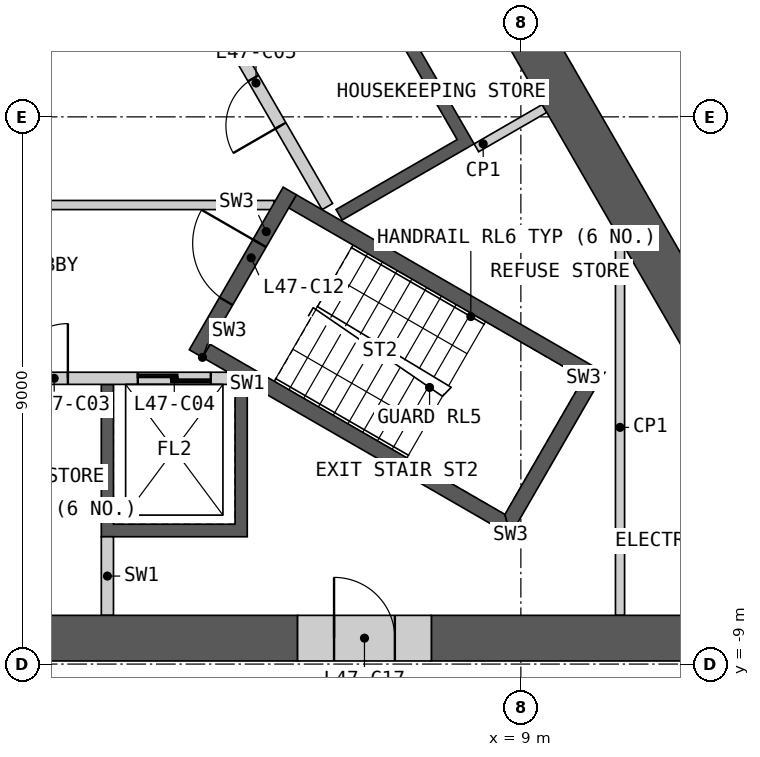
"""IFC4 building model, lengths in metres.
Left out: names, types, materials, properties, quantities, classifications, styles, units other than length and angle.
Written with IfcOpenShell. Run it as: python <this file> out.ifc"""

import sys

from ifc_helpers import new_model, si_unit, direction, frame, frame_2d, origin, place, context, subcontext, project, spatial, polyline, rectangle, outline, extrude, element, fill, save


model = new_model("IFC4")
c1 = context("Model", 3, precision=1e-05, world=origin(), true_north=direction((0.0, 1.0)))
c2 = subcontext(c1, "Body", "Model", "MODEL_VIEW")
j1 = project(units=[si_unit("LENGTHUNIT", "METRE"), si_unit("PLANEANGLEUNIT", "RADIAN")], contexts=[c1])
p1 = place(None, origin())
s1 = spatial("IfcSite", under=j1, at=p1, CompositionType="ELEMENT")
p2 = place(p1, origin())
s2 = spatial("IfcBuilding", under=s1, at=p2, CompositionType="ELEMENT")
p3 = place(p2, frame((0.0, 0.0, 212.4)))
s3 = spatial("IfcBuildingStorey", under=s2, at=p3, CompositionType="ELEMENT", Elevation=212.4)
p4 = place(p3, origin())
e1 = element("IfcWall", 1, at=p4, inside=s3, PredefinedType="SHEAR", context=c2, shape_type="SweptSolid", body=[
    extrude(outline(polyline([(4.5, -4.4), (4.5, -6.906), (2.1, -6.906), (2.1, -4.4), (2.3, -4.4), (2.3, -6.7), (4.3, -6.7), (4.3, -4.4), (4.5, -4.4)])), origin(), (0.0, 0.0, 1.0), 3.25),
])
p5 = place(p3, frame((-4.187, -4.3, 0.0), z_axis=(0.0, 0.0, 1.0), x_axis=(1.0, 0.0, 0.0)))
e2 = element("IfcWall", 2, at=p5, inside=s3, PredefinedType="SOLIDWALL", context=c2, shape_type="SweptSolid", body=[
    extrude(rectangle(XDim=8.373, YDim=0.2, at=frame_2d((4.187, 0.0))), origin(), (0.0, 0.0, 1.0), 3.25),
])
p6 = place(p5, frame((0.287, 0.0, 0.0)))
e3 = element("IfcOpeningElement", 3, at=p6, cuts=e2, PredefinedType="OPENING", context=c2, shape_type="SweptSolid", body=[
    extrude(rectangle(XDim=1.2, YDim=2.1, at=frame_2d((0.6, 1.05))), frame((0.0, 0.11, 0.0), z_axis=(0.0, -1.0, 0.0), x_axis=(1.0, 0.0, 0.0)), (0.0, 0.0, 1.0), 0.22),
])
p7 = place(p5, frame((2.387, 0.0, 0.0)))
e4 = element("IfcOpeningElement", 4, at=p7, cuts=e2, PredefinedType="OPENING", context=c2, shape_type="SweptSolid", body=[
    extrude(rectangle(XDim=1.4, YDim=2.1, at=frame_2d((0.7, 1.05))), frame((0.0, 0.11, 0.0), z_axis=(0.0, -1.0, 0.0), x_axis=(1.0, 0.0, 0.0)), (0.0, 0.0, 1.0), 0.22),
])
p8 = place(p5, frame((4.837, 0.0, 0.0)))
e5 = element("IfcOpeningElement", 5, at=p8, cuts=e2, PredefinedType="OPENING", context=c2, shape_type="SweptSolid", body=[
    extrude(rectangle(XDim=0.9, YDim=2.1, at=frame_2d((0.45, 1.05))), frame((0.0, 0.11, 0.0), z_axis=(0.0, -1.0, 0.0), x_axis=(1.0, 0.0, 0.0)), (0.0, 0.0, 1.0), 0.22),
])
p9 = place(p5, frame((6.887, 0.0, 0.0)))
e6 = element("IfcOpeningElement", 6, at=p9, cuts=e2, PredefinedType="OPENING", context=c2, shape_type="SweptSolid", body=[
    extrude(rectangle(XDim=1.2, YDim=2.1, at=frame_2d((0.6, 1.05))), frame((0.0, 0.11, 0.0), z_axis=(0.0, -1.0, 0.0), x_axis=(1.0, 0.0, 0.0)), (0.0, 0.0, 1.0), 0.22),
])
p10 = place(p3, frame((2.2, -6.906, 0.0), z_axis=(0.0, 0.0, 1.0), x_axis=(0.0, -1.0, 0.0)))
e7 = element("IfcWall", 7, at=p10, inside=s3, PredefinedType="SHEAR", context=c2, shape_type="SweptSolid", body=[
    extrude(rectangle(XDim=1.293, YDim=0.2, at=frame_2d((0.646, 0.0))), origin(), (0.0, 0.0, 1.0), 3.25),
])
p11 = place(p3, origin())
e8 = element("IfcWall", 8, at=p11, inside=s3, PredefinedType="SHEAR", context=c2, shape_type="SweptSolid", body=[
    extrude(outline(polyline([(3.76, 2.287), (5.931, 3.54), (8.231, -0.444), (6.061, -1.697), (5.96, -1.524), (7.952, -0.374), (5.852, 3.263), (3.861, 2.113), (3.76, 2.287)])), origin(), (0.0, 0.0, 1.0), 3.25),
])
p12 = place(p3, frame((5.817, -1.476, 0.0), z_axis=(0.0, 0.0, 1.0), x_axis=(-0.500002616675, 0.866023893041, 0.0)))
e9 = element("IfcWall", 9, at=p12, inside=s3, PredefinedType="SOLIDWALL", context=c2, shape_type="SweptSolid", body=[
    extrude(rectangle(XDim=8.373, YDim=0.2, at=frame_2d((4.187, 0.0))), origin(), (0.0, 0.0, 1.0), 3.25),
])
p13 = place(p12, frame((1.537, 0.0, 0.0)))
e10 = element("IfcOpeningElement", 10, at=p13, cuts=e9, PredefinedType="OPENING", context=c2, shape_type="SweptSolid", body=[
    extrude(rectangle(XDim=0.9, YDim=2.1, at=frame_2d((0.45, 1.05))), frame((0.0, 0.11, 0.0), z_axis=(0.0, -1.0, 0.0), x_axis=(1.0, 0.0, 0.0)), (0.0, 0.0, 1.0), 0.22),
])
p14 = place(p12, frame((4.837, 0.0, 0.0)))
e11 = element("IfcOpeningElement", 11, at=p14, cuts=e9, PredefinedType="OPENING", context=c2, shape_type="SweptSolid", body=[
    extrude(rectangle(XDim=0.9, YDim=2.1, at=frame_2d((0.45, 1.05))), frame((0.0, 0.11, 0.0), z_axis=(0.0, -1.0, 0.0), x_axis=(1.0, 0.0, 0.0)), (0.0, 0.0, 1.0), 0.22),
])
p15 = place(p12, frame((6.937, 0.0, 0.0)))
e12 = element("IfcOpeningElement", 12, at=p15, cuts=e9, PredefinedType="OPENING", context=c2, shape_type="SweptSolid", body=[
    extrude(rectangle(XDim=1.1, YDim=2.1, at=frame_2d((0.55, 1.05))), frame((0.0, 0.11, 0.0), z_axis=(0.0, -1.0, 0.0), x_axis=(1.0, 0.0, 0.0)), (0.0, 0.0, 1.0), 0.22),
])
p16 = place(p3, frame((-4.941, -1.45, 0.0), z_axis=(0.0, 0.0, 1.0), x_axis=(1.0, 0.0, 0.0)))
e13 = element("IfcWall", 13, at=p16, inside=s3, PredefinedType="PARTITIONING", context=c2, shape_type="SweptSolid", body=[
    extrude(rectangle(XDim=9.882, YDim=0.15, at=frame_2d((4.941, 0.0))), origin(), (0.0, 0.0, 1.0), 3.25),
])
p17 = place(p16, frame((4.391, 0.0, 0.0)))
e14 = element("IfcOpeningElement", 14, at=p17, cuts=e13, PredefinedType="OPENING", context=c2, shape_type="SweptSolid", body=[
    extrude(rectangle(XDim=1.1, YDim=2.1, at=frame_2d((0.55, 1.05))), frame((0.0, 0.085, 0.0), z_axis=(0.0, -1.0, 0.0), x_axis=(1.0, 0.0, 0.0)), (0.0, 0.0, 1.0), 0.17),
])
p18 = place(p3, origin())
e15 = element("IfcWall", 15, at=p18, inside=s3, PredefinedType="SHEAR", context=c2, shape_type="SweptSolid", body=[
    extrude(outline(polyline([(3.763, -3.956), (8.83, -6.881), (8.738, -6.539), (3.888, -3.739), (3.763, -3.956)])), origin(), (0.0, 0.0, 1.0), 3.25),
])
p19 = place(p3, origin())
e16 = element("IfcWall", 16, at=p19, inside=s3, PredefinedType="SHEAR", context=c2, shape_type="SweptSolid", body=[
    extrude(outline(polyline([(8.83, -6.881), (10.374, -4.206), (10.032, -4.298), (8.738, -6.539), (8.83, -6.881)])), origin(), (0.0, 0.0, 1.0), 3.25),
])
p20 = place(p3, origin())
e17 = element("IfcWall", 17, at=p20, inside=s3, PredefinedType="SHEAR", context=c2, shape_type="SweptSolid", body=[
    extrude(outline(polyline([(10.032, -4.298), (10.374, -4.206), (5.307, -1.281), (5.182, -1.498), (10.032, -4.298)])), origin(), (0.0, 0.0, 1.0), 3.25),
])
p21 = place(p3, frame((3.655, -3.893, 0.0), z_axis=(0.0, 0.0, 1.0), x_axis=(0.499982516597, 0.866035497597, 0.0)))
e18 = element("IfcWall", 18, at=p21, inside=s3, PredefinedType="SHEAR", context=c2, shape_type="SweptSolid", body=[
    extrude(rectangle(XDim=3.088, YDim=0.25, at=frame_2d((1.544, 0.0))), origin(), (0.0, 0.0, 1.0), 3.25),
])
p22 = place(p21, frame((0.994, 0.0, 0.0)))
e19 = element("IfcOpeningElement", 19, at=p22, cuts=e18, PredefinedType="OPENING", context=c2, shape_type="SweptSolid", body=[
    extrude(rectangle(XDim=1.1, YDim=2.1, at=frame_2d((0.55, 1.05))), frame((0.0, 0.135, 0.0), z_axis=(0.0, -1.0, 0.0), x_axis=(1.0, 0.0, 0.0)), (0.0, 0.0, 1.0), 0.27),
])
p23 = place(p3, frame((8.268, -0.509, 0.0), z_axis=(0.0, 0.0, 1.0), x_axis=(0.866003189247, 0.500038474733, 0.0)))
e20 = element("IfcWall", 20, at=p23, inside=s3, PredefinedType="PARTITIONING", context=c2, shape_type="SweptSolid", body=[
    extrude(rectangle(XDim=1.293, YDim=0.15, at=frame_2d((0.646, 0.0))), origin(), (0.0, 0.0, 1.0), 3.25),
])
p24 = place(p3, frame((10.631, -8.199, 0.0), z_axis=(0.0, 0.0, 1.0), x_axis=(0.0, 1.0, 0.0)))
e21 = element("IfcWall", 21, at=p24, inside=s3, PredefinedType="PARTITIONING", context=c2, shape_type="SweptSolid", body=[
    extrude(rectangle(XDim=6.184, YDim=0.15, at=frame_2d((3.092, 0.0))), origin(), (0.0, 0.0, 1.0), 3.25),
])
p25 = place(p3, frame((7.528, -8.574, 0.0), z_axis=(0.0, 0.0, 1.0), x_axis=(1.0, 0.0, 0.0)))
e22 = element("IfcWall", 22, at=p25, inside=s3, PredefinedType="SHEAR", context=c2, shape_type="SweptSolid", body=[
    extrude(rectangle(XDim=6.673, YDim=0.75, at=frame_2d((3.336, 0.0))), origin(), (0.0, 0.0, 1.0), 3.25),
])
p26 = place(p3, frame((-1.078, -8.574, 0.0), z_axis=(0.0, 0.0, 1.0), x_axis=(1.0, 0.0, 0.0)))
e23 = element("IfcWall", 23, at=p26, inside=s3, PredefinedType="SHEAR", context=c2, shape_type="SweptSolid", body=[
    extrude(rectangle(XDim=6.406, YDim=0.75, at=frame_2d((3.203, 0.0))), origin(), (0.0, 0.0, 1.0), 3.25),
])
p27 = place(p3, frame((12.228, -4.032, 0.0), z_axis=(0.0, 0.0, 1.0), x_axis=(-0.499993760127, 0.866029006347, 0.0)))
e24 = element("IfcWall", 24, at=p27, inside=s3, PredefinedType="SHEAR", context=c2, shape_type="SweptSolid", body=[
    extrude(rectangle(XDim=6.206, YDim=0.75, at=frame_2d((3.103, 0.0))), origin(), (0.0, 0.0, 1.0), 3.25),
])
p28 = place(p3, frame((5.328, -8.574, 0.0), z_axis=(0.0, 0.0, 1.0), x_axis=(1.0, 0.0, 0.0)))
e25 = element("IfcWall", 25, at=p28, inside=s3, PredefinedType="SHEAR", context=c2, shape_type="SweptSolid", body=[
    extrude(rectangle(XDim=2.2, YDim=0.75, at=frame_2d((1.1, 0.0))), origin(), (0.0, 0.0, 1.0), 3.25),
])
p29 = place(p28, frame((0.6, 0.0, 0.0)))
e26 = element("IfcOpeningElement", 26, at=p29, cuts=e25, PredefinedType="OPENING", context=c2, shape_type="SweptSolid", body=[
    extrude(rectangle(XDim=1.0, YDim=2.1, at=frame_2d((0.5, 1.05))), frame((0.0, 0.385, 0.0), z_axis=(0.0, -1.0, 0.0), x_axis=(1.0, 0.0, 0.0)), (0.0, 0.0, 1.0), 0.77),
])
p30 = place(p3, frame((5.377, 19.385, 0.0), z_axis=(0.0, 0.0, 1.0), x_axis=(0.500000757641, -0.86602496636, 0.0)))
e27 = element("IfcWall", 27, at=p30, inside=s3, PredefinedType="PARTITIONING", context=c2, shape_type="SweptSolid", body=[
    extrude(rectangle(XDim=28.198, YDim=0.2, at=frame_2d((14.099, 0.0))), origin(), (0.0, 0.0, 1.0), 3.25),
])
p31 = place(p30, frame((25.345, 0.0, 0.0)))
e28 = element("IfcOpeningElement", 28, at=p31, cuts=e27, PredefinedType="OPENING", context=c2, shape_type="SweptSolid", body=[
    extrude(rectangle(XDim=1.8, YDim=2.1, at=frame_2d((0.9, 1.05))), frame((0.0, 0.11, 0.0), z_axis=(0.0, -1.0, 0.0), x_axis=(1.0, 0.0, 0.0)), (0.0, 0.0, 1.0), 0.22),
])
p32 = place(p30, frame((19.621, 0.0, 0.0)))
e29 = element("IfcOpeningElement", 29, at=p32, cuts=e27, PredefinedType="OPENING", context=c2, shape_type="SweptSolid", body=[
    extrude(rectangle(XDim=1.0, YDim=2.1, at=frame_2d((0.5, 1.05))), frame((0.0, 0.11, 0.0), z_axis=(0.0, -1.0, 0.0), x_axis=(1.0, 0.0, 0.0)), (0.0, 0.0, 1.0), 0.22),
])
p33 = place(p30, frame((16.409, 0.0, 0.0)))
e30 = element("IfcOpeningElement", 30, at=p33, cuts=e27, PredefinedType="OPENING", context=c2, shape_type="SweptSolid", body=[
    extrude(rectangle(XDim=1.1, YDim=2.1, at=frame_2d((0.55, 1.05))), frame((0.0, 0.11, 0.0), z_axis=(0.0, -1.0, 0.0), x_axis=(1.0, 0.0, 0.0)), (0.0, 0.0, 1.0), 0.22),
])
p34 = place(p30, frame((1.452, 0.0, 0.0)))
e31 = element("IfcOpeningElement", 31, at=p34, cuts=e27, PredefinedType="OPENING", context=c2, shape_type="SweptSolid", body=[
    extrude(rectangle(XDim=0.95, YDim=2.1, at=frame_2d((0.475, 1.05))), frame((0.0, 0.11, 0.0), z_axis=(0.0, -1.0, 0.0), x_axis=(1.0, 0.0, 0.0)), (0.0, 0.0, 1.0), 0.22),
])
p35 = place(p8, origin())
e32 = element("IfcDoor", 32, at=p35, inside=s3, OperationType="SINGLE_SWING_RIGHT", PredefinedType="DOOR", context=c2, shape_type="SweptSolid", body=[
    extrude(rectangle(XDim=0.9, YDim=2.1, at=frame_2d((0.45, 1.05))), frame((0.0, 0.025, 0.0), z_axis=(0.0, -1.0, 0.0), x_axis=(1.0, 0.0, 0.0)), (0.0, 0.0, 1.0), 0.05),
])
fill(e5, e32)
p36 = place(p9, origin())
e33 = element("IfcDoor", 33, at=p36, inside=s3, OperationType="SLIDING_TO_LEFT", PredefinedType="DOOR", context=c2, shape_type="SweptSolid", body=[
    extrude(rectangle(XDim=1.2, YDim=2.1, at=frame_2d((0.6, 1.05))), frame((0.0, 0.025, 0.0), z_axis=(0.0, -1.0, 0.0), x_axis=(1.0, 0.0, 0.0)), (0.0, 0.0, 1.0), 0.05),
])
fill(e6, e33)
p37 = place(p13, origin())
e34 = element("IfcDoor", 34, at=p37, inside=s3, OperationType="SINGLE_SWING_LEFT", PredefinedType="DOOR", context=c2, shape_type="SweptSolid", body=[
    extrude(rectangle(XDim=0.9, YDim=2.1, at=frame_2d((0.45, 1.05))), frame((0.0, 0.025, 0.0), z_axis=(0.0, -1.0, 0.0), x_axis=(1.0, 0.0, 0.0)), (0.0, 0.0, 1.0), 0.05),
])
fill(e10, e34)
p38 = place(p22, origin())
e35 = element("IfcDoor", 35, at=p38, inside=s3, OperationType="SINGLE_SWING_RIGHT", PredefinedType="DOOR", context=c2, shape_type="SweptSolid", body=[
    extrude(rectangle(XDim=1.1, YDim=2.1, at=frame_2d((0.55, 1.05))), frame((0.0, 0.025, 0.0), z_axis=(0.0, -1.0, 0.0), x_axis=(1.0, 0.0, 0.0)), (0.0, 0.0, 1.0), 0.05),
])
fill(e19, e35)
p39 = place(p29, origin())
e36 = element("IfcDoor", 36, at=p39, inside=s3, OperationType="SINGLE_SWING_LEFT", PredefinedType="DOOR", context=c2, shape_type="SweptSolid", body=[
    extrude(rectangle(XDim=1.0, YDim=2.1, at=frame_2d((0.5, 1.05))), frame((0.0, 0.13, 0.0), z_axis=(0.0, -1.0, 0.0), x_axis=(1.0, 0.0, 0.0)), (0.0, 0.0, 1.0), 0.05),
])
fill(e26, e36)
save(model, sys.argv[1])
